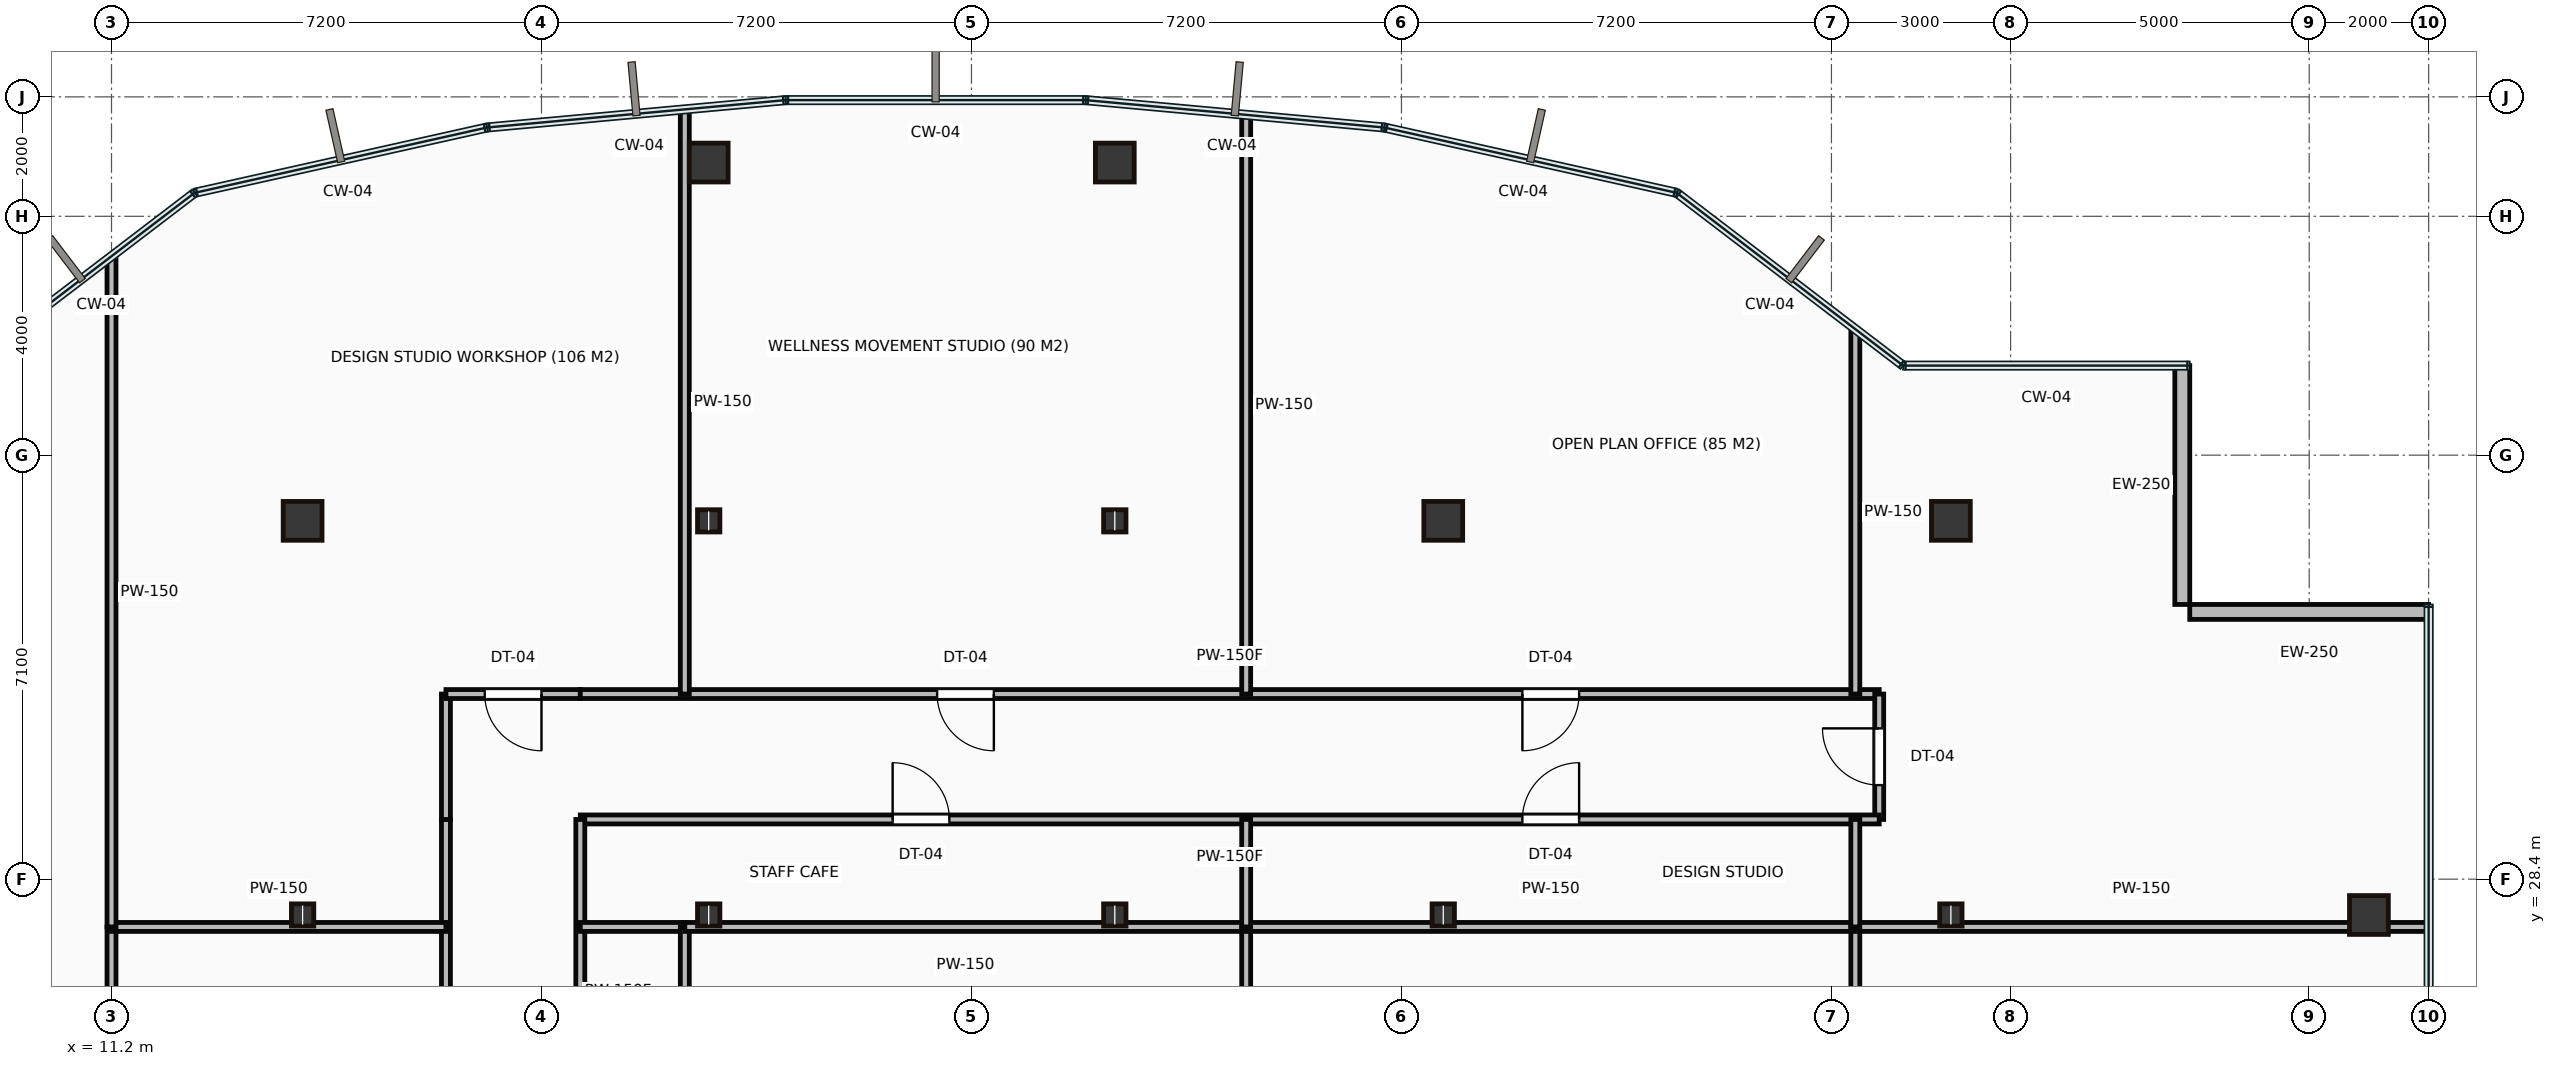
"""IFC4 building model, lengths in metres.
Left out: names, types, materials, properties, quantities, classifications, styles, units other than length and angle.
Written with IfcOpenShell. Run it as: python <this file> out.ifc"""

import sys

from ifc_helpers import new_model, si_unit, direction, frame, frame_2d, origin, origin_2d, place, context, subcontext, project, spatial, rectangle, hollow_rectangle, i_section, extrude, source, transform, mapped, element, fill, save


model = new_model("IFC4")
c1 = context("Model", 3, precision=1e-05, world=origin(), true_north=direction((0.0, 1.0)))
c2 = subcontext(c1, "Body", "Model", "MODEL_VIEW")
j1 = project(units=[si_unit("LENGTHUNIT", "METRE"), si_unit("PLANEANGLEUNIT", "RADIAN")], contexts=[c1])
p1 = place(None, origin())
s1 = spatial("IfcSite", under=j1, at=p1, CompositionType="ELEMENT")
p2 = place(p1, origin())
s2 = spatial("IfcBuilding", under=s1, at=p2, CompositionType="ELEMENT")
p3 = place(p2, frame((0.0, 0.0, 173.45)))
s3 = spatial("IfcBuildingStorey", under=s2, at=p3, CompositionType="ELEMENT", Elevation=173.45)
m1 = source(origin(), c2, "Body", "SweptSolid", [
    extrude(i_section(OverallWidth=0.374, OverallDepth=0.372, WebThickness=0.016, FlangeThickness=0.026, at=origin_2d()), origin(), (0.0, 0.0, 1.0), 3.65),
])
p4 = place(p3, frame((14.4, 27.8, 0.0), z_axis=(0.0, 0.0, 1.0), x_axis=(1.0, 0.0, 0.0)))
e1 = element("IfcColumn", 1, at=p4, inside=s3, PredefinedType="COLUMN", context=c2, shape_type="MappedRepresentation", body=[
    mapped(m1, transform((0.0, 0.0, 0.0))),
])
m2 = source(origin(), c2, "Body", "SweptSolid", [
    extrude(hollow_rectangle(XDim=0.65, YDim=0.65, WallThickness=0.032, at=origin_2d()), origin(), (0.0, 0.0, 1.0), 3.65),
])
p5 = place(p3, frame((14.4, 34.4, 0.0), z_axis=(0.0, 0.0, 1.0), x_axis=(1.0, 0.0, 0.0)))
e2 = element("IfcColumn", 2, at=p5, inside=s3, PredefinedType="COLUMN", context=c2, shape_type="MappedRepresentation", body=[
    mapped(m2, transform((0.0, 0.0, 0.0))),
])
for number, where, z_axis, x_axis in (
    (3, (21.2, 27.8, 0.0), (0.0, 0.0, 1.0), (1.0, 0.0, 0.0)),
    (4, (21.2, 34.4, 0.0), (0.0, 0.0, 1.0), (1.0, 0.0, 0.0)),
):
    element("IfcColumn", number, at=place(p3, frame(where, z_axis=z_axis, x_axis=x_axis)), inside=s3, PredefinedType="COLUMN", context=c2, shape_type="MappedRepresentation", body=[
        mapped(m1, transform((0.0, 0.0, 0.0))),
    ])
p6 = place(p3, frame((21.2, 40.4, 0.0), z_axis=(0.0, 0.0, 1.0), x_axis=(1.0, 0.0, 0.0)))
e5 = element("IfcColumn", 5, at=p6, inside=s3, PredefinedType="COLUMN", context=c2, shape_type="MappedRepresentation", body=[
    mapped(m2, transform((0.0, 0.0, 0.0))),
])
for number, where, z_axis, x_axis in (
    (6, (28.0, 27.8, 0.0), (0.0, 0.0, 1.0), (1.0, 0.0, 0.0)),
    (7, (28.0, 34.4, 0.0), (0.0, 0.0, 1.0), (1.0, 0.0, 0.0)),
):
    element("IfcColumn", number, at=place(p3, frame(where, z_axis=z_axis, x_axis=x_axis)), inside=s3, PredefinedType="COLUMN", context=c2, shape_type="MappedRepresentation", body=[
        mapped(m1, transform((0.0, 0.0, 0.0))),
    ])
p7 = place(p3, frame((28.0, 40.4, 0.0), z_axis=(0.0, 0.0, 1.0), x_axis=(1.0, 0.0, 0.0)))
e8 = element("IfcColumn", 8, at=p7, inside=s3, PredefinedType="COLUMN", context=c2, shape_type="MappedRepresentation", body=[
    mapped(m2, transform((0.0, 0.0, 0.0))),
])
p8 = place(p3, frame((33.5, 27.8, 0.0), z_axis=(0.0, 0.0, 1.0), x_axis=(1.0, 0.0, 0.0)))
e9 = element("IfcColumn", 9, at=p8, inside=s3, PredefinedType="COLUMN", context=c2, shape_type="MappedRepresentation", body=[
    mapped(m1, transform((0.0, 0.0, 0.0))),
])
p9 = place(p3, frame((33.5, 34.4, 0.0), z_axis=(0.0, 0.0, 1.0), x_axis=(1.0, 0.0, 0.0)))
e10 = element("IfcColumn", 10, at=p9, inside=s3, PredefinedType="COLUMN", context=c2, shape_type="MappedRepresentation", body=[
    mapped(m2, transform((0.0, 0.0, 0.0))),
])
p10 = place(p3, frame((42.0, 27.8, 0.0), z_axis=(0.0, 0.0, 1.0), x_axis=(1.0, 0.0, 0.0)))
e11 = element("IfcColumn", 11, at=p10, inside=s3, PredefinedType="COLUMN", context=c2, shape_type="MappedRepresentation", body=[
    mapped(m1, transform((0.0, 0.0, 0.0))),
])
for number, where, z_axis, x_axis in (
    (12, (42.0, 34.4, 0.0), (0.0, 0.0, 1.0), (1.0, 0.0, 0.0)),
    (13, (49.0, 27.8, 0.0), (0.0, 0.0, 1.0), (1.0, 0.0, 0.0)),
):
    element("IfcColumn", number, at=place(p3, frame(where, z_axis=z_axis, x_axis=x_axis)), inside=s3, PredefinedType="COLUMN", context=c2, shape_type="MappedRepresentation", body=[
        mapped(m2, transform((0.0, 0.0, 0.0))),
    ])
m3 = source(origin(), c2, "Body", "SweptSolid", [
    extrude(rectangle(XDim=4.0, YDim=0.25, at=frame_2d((2.0, 0.0))), origin(), (0.0, 0.0, 1.0), 3.4),
])
for number, where, z_axis, x_axis in (
    (14, (50.0, 32.875, 0.0), (0.0, 0.0, 1.0), (-1.0, 0.0, 0.0)),
    (15, (45.875, 33.0, 0.0), (0.0, 0.0, 1.0), (0.0, 1.0, 0.0)),
):
    element("IfcWall", number, at=place(p3, frame(where, z_axis=z_axis, x_axis=x_axis)), inside=s3, PredefinedType="STANDARD", context=c2, shape_type="MappedRepresentation", body=[
        mapped(m3, transform((0.0, 0.0, 0.0))),
    ])
m4 = source(origin(), c2, "Body", "SweptSolid", [
    extrude(rectangle(XDim=13.1, YDim=0.15, at=frame_2d((6.55, 0.0))), origin(), (0.0, 0.0, 1.0), 3.4),
])
p11 = place(p3, frame((16.8, 16.3, 0.0), z_axis=(0.0, 0.0, 1.0), x_axis=(0.0, 1.0, 0.0)))
e16 = element("IfcWall", 16, at=p11, inside=s3, PredefinedType="PARTITIONING", context=c2, shape_type="MappedRepresentation", body=[
    mapped(m4, transform((0.0, 0.0, 0.0))),
])
p12 = place(p11, frame((5.305, 0.0, 0.0)))
e17 = element("IfcOpeningElement", 17, at=p12, cuts=e16, PredefinedType="OPENING", context=c2, shape_type="SweptSolid", body=[
    extrude(rectangle(XDim=0.95, YDim=2.15, at=frame_2d((0.475, 1.075))), frame((0.0, 0.085, 0.0), z_axis=(0.0, -1.0, 0.0), x_axis=(1.0, 0.0, 0.0)), (0.0, 0.0, 1.0), 0.17),
])
m5 = source(origin(), c2, "Body", "SweptSolid", [
    extrude(rectangle(XDim=2.1, YDim=0.15, at=frame_2d((1.05, 0.0))), origin(), (0.0, 0.0, 1.0), 3.4),
])
p13 = place(p3, frame((16.8, 29.4, 0.0), z_axis=(0.0, 0.0, 1.0), x_axis=(0.0, 1.0, 0.0)))
e18 = element("IfcWall", 18, at=p13, inside=s3, PredefinedType="PARTITIONING", context=c2, shape_type="MappedRepresentation", body=[
    mapped(m5, transform((0.0, 0.0, 0.0))),
])
m6 = source(origin(), c2, "Body", "SweptSolid", [
    extrude(rectangle(XDim=2.25, YDim=0.15, at=frame_2d((1.125, 0.0))), origin(), (0.0, 0.0, 1.0), 3.4),
])
p14 = place(p3, frame((16.8, 31.5, 0.0), z_axis=(0.0, 0.0, 1.0), x_axis=(1.0, 0.0, 0.0)))
e19 = element("IfcWall", 19, at=p14, inside=s3, PredefinedType="PARTITIONING", context=c2, shape_type="MappedRepresentation", body=[
    mapped(m6, transform((0.0, 0.0, 0.0))),
])
p15 = place(p14, frame((0.65, 0.0, 0.0)))
e20 = element("IfcOpeningElement", 20, at=p15, cuts=e19, PredefinedType="OPENING", context=c2, shape_type="SweptSolid", body=[
    extrude(rectangle(XDim=0.95, YDim=2.15, at=frame_2d((0.475, 1.075))), frame((0.0, 0.085, 0.0), z_axis=(0.0, -1.0, 0.0), x_axis=(1.0, 0.0, 0.0)), (0.0, 0.0, 1.0), 0.17),
])
m7 = source(origin(), c2, "Body", "SweptSolid", [
    extrude(rectangle(XDim=21.75, YDim=0.15, at=frame_2d((10.875, 0.0))), origin(), (0.0, 0.0, 1.0), 3.4),
])
p16 = place(p3, frame((19.05, 31.5, 0.0), z_axis=(0.0, 0.0, 1.0), x_axis=(1.0, 0.0, 0.0)))
e21 = element("IfcWall", 21, at=p16, inside=s3, PredefinedType="PARTITIONING", context=c2, shape_type="MappedRepresentation", body=[
    mapped(m7, transform((0.0, 0.0, 0.0))),
])
p17 = place(p16, frame((5.975, 0.0, 0.0)))
e22 = element("IfcOpeningElement", 22, at=p17, cuts=e21, PredefinedType="OPENING", context=c2, shape_type="SweptSolid", body=[
    extrude(rectangle(XDim=0.95, YDim=2.15, at=frame_2d((0.475, 1.075))), frame((0.0, 0.085, 0.0), z_axis=(0.0, -1.0, 0.0), x_axis=(1.0, 0.0, 0.0)), (0.0, 0.0, 1.0), 0.17),
])
p18 = place(p16, frame((15.775, 0.0, 0.0)))
e23 = element("IfcOpeningElement", 23, at=p18, cuts=e21, PredefinedType="OPENING", context=c2, shape_type="SweptSolid", body=[
    extrude(rectangle(XDim=0.95, YDim=2.15, at=frame_2d((0.475, 1.075))), frame((0.0, 0.085, 0.0), z_axis=(0.0, -1.0, 0.0), x_axis=(1.0, 0.0, 0.0)), (0.0, 0.0, 1.0), 0.17),
])
p19 = place(p3, frame((40.8, 31.5, 0.0), z_axis=(0.0, 0.0, 1.0), x_axis=(0.0, -1.0, 0.0)))
e24 = element("IfcWall", 24, at=p19, inside=s3, PredefinedType="PARTITIONING", context=c2, shape_type="MappedRepresentation", body=[
    mapped(m5, transform((0.0, 0.0, 0.0))),
])
p20 = place(p19, frame((0.575, 0.0, 0.0)))
e25 = element("IfcOpeningElement", 25, at=p20, cuts=e24, PredefinedType="OPENING", context=c2, shape_type="SweptSolid", body=[
    extrude(rectangle(XDim=0.95, YDim=2.15, at=frame_2d((0.475, 1.075))), frame((0.0, 0.085, 0.0), z_axis=(0.0, -1.0, 0.0), x_axis=(1.0, 0.0, 0.0)), (0.0, 0.0, 1.0), 0.17),
])
p21 = place(p3, frame((40.8, 29.4, 0.0), z_axis=(0.0, 0.0, 1.0), x_axis=(-1.0, 0.0, 0.0)))
e26 = element("IfcWall", 26, at=p21, inside=s3, PredefinedType="PARTITIONING", context=c2, shape_type="MappedRepresentation", body=[
    mapped(m7, transform((0.0, 0.0, 0.0))),
])
p22 = place(p21, frame((15.57, 0.0, 0.0)))
e27 = element("IfcOpeningElement", 27, at=p22, cuts=e26, PredefinedType="OPENING", context=c2, shape_type="SweptSolid", body=[
    extrude(rectangle(XDim=0.95, YDim=2.15, at=frame_2d((0.475, 1.075))), frame((0.0, 0.085, 0.0), z_axis=(0.0, -1.0, 0.0), x_axis=(1.0, 0.0, 0.0)), (0.0, 0.0, 1.0), 0.17),
])
p23 = place(p21, frame((5.025, 0.0, 0.0)))
e28 = element("IfcOpeningElement", 28, at=p23, cuts=e26, PredefinedType="OPENING", context=c2, shape_type="SweptSolid", body=[
    extrude(rectangle(XDim=0.95, YDim=2.15, at=frame_2d((0.475, 1.075))), frame((0.0, 0.085, 0.0), z_axis=(0.0, -1.0, 0.0), x_axis=(1.0, 0.0, 0.0)), (0.0, 0.0, 1.0), 0.17),
])
p24 = place(p3, frame((19.05, 29.4, 0.0), z_axis=(0.0, 0.0, 1.0), x_axis=(0.0, -1.0, 0.0)))
e29 = element("IfcWall", 29, at=p24, inside=s3, PredefinedType="PARTITIONING", context=c2, shape_type="MappedRepresentation", body=[
    mapped(m4, transform((0.0, 0.0, 0.0))),
])
p25 = place(p24, frame((6.845, 0.0, 0.0)))
e30 = element("IfcOpeningElement", 30, at=p25, cuts=e29, PredefinedType="OPENING", context=c2, shape_type="SweptSolid", body=[
    extrude(rectangle(XDim=0.95, YDim=2.15, at=frame_2d((0.475, 1.075))), frame((0.0, 0.085, 0.0), z_axis=(0.0, -1.0, 0.0), x_axis=(1.0, 0.0, 0.0)), (0.0, 0.0, 1.0), 0.17),
])
m8 = source(origin(), c2, "Body", "SweptSolid", [
    extrude(rectangle(XDim=11.3, YDim=0.15, at=frame_2d((5.65, 0.0))), origin(), (0.0, 0.0, 1.0), 3.4),
])
p26 = place(p3, frame((11.2, 27.6, 0.0), z_axis=(0.0, 0.0, 1.0), x_axis=(0.0, -1.0, 0.0)))
e31 = element("IfcWall", 31, at=p26, inside=s3, PredefinedType="PARTITIONING", context=c2, shape_type="MappedRepresentation", body=[
    mapped(m8, transform((0.0, 0.0, 0.0))),
])
m9 = source(origin(), c2, "Body", "SweptSolid", [
    extrude(rectangle(XDim=5.6, YDim=0.15, at=frame_2d((2.8, 0.0))), origin(), (0.0, 0.0, 1.0), 3.4),
])
p27 = place(p3, frame((11.2, 27.6, 0.0), z_axis=(0.0, 0.0, 1.0), x_axis=(1.0, 0.0, 0.0)))
e32 = element("IfcWall", 32, at=p27, inside=s3, PredefinedType="PARTITIONING", context=c2, shape_type="MappedRepresentation", body=[
    mapped(m9, transform((0.0, 0.0, 0.0))),
])
m10 = source(origin(), c2, "Body", "SweptSolid", [
    extrude(rectangle(XDim=11.206, YDim=0.15, at=frame_2d((5.603, 0.0))), origin(), (0.0, 0.0, 1.0), 3.4),
])
p28 = place(p3, frame((11.2, 38.806, 0.0), z_axis=(0.0, 0.0, 1.0), x_axis=(0.0, -1.0, 0.0)))
e33 = element("IfcWall", 33, at=p28, inside=s3, PredefinedType="PARTITIONING", context=c2, shape_type="MappedRepresentation", body=[
    mapped(m10, transform((0.0, 0.0, 0.0))),
])
m11 = source(origin(), c2, "Body", "SweptSolid", [
    extrude(rectangle(XDim=1.75, YDim=0.15, at=frame_2d((0.875, 0.0))), origin(), (0.0, 0.0, 1.0), 3.4),
])
p29 = place(p3, frame((19.05, 27.6, 0.0), z_axis=(0.0, 0.0, 1.0), x_axis=(1.0, 0.0, 0.0)))
e34 = element("IfcWall", 34, at=p29, inside=s3, PredefinedType="PARTITIONING", context=c2, shape_type="MappedRepresentation", body=[
    mapped(m11, transform((0.0, 0.0, 0.0))),
])
p30 = place(p3, frame((20.8, 27.6, 0.0), z_axis=(0.0, 0.0, 1.0), x_axis=(0.0, -1.0, 0.0)))
e35 = element("IfcWall", 35, at=p30, inside=s3, PredefinedType="PARTITIONING", context=c2, shape_type="MappedRepresentation", body=[
    mapped(m8, transform((0.0, 0.0, 0.0))),
])
m12 = source(origin(), c2, "Body", "SweptSolid", [
    extrude(rectangle(XDim=9.4, YDim=0.15, at=frame_2d((4.7, 0.0))), origin(), (0.0, 0.0, 1.0), 3.4),
])
p31 = place(p3, frame((30.2, 27.6, 0.0), z_axis=(0.0, 0.0, 1.0), x_axis=(-1.0, 0.0, 0.0)))
e36 = element("IfcWall", 36, at=p31, inside=s3, PredefinedType="PARTITIONING", context=c2, shape_type="MappedRepresentation", body=[
    mapped(m12, transform((0.0, 0.0, 0.0))),
])
m13 = source(origin(), c2, "Body", "SweptSolid", [
    extrude(rectangle(XDim=9.771, YDim=0.15, at=frame_2d((4.885, 0.0))), origin(), (0.0, 0.0, 1.0), 3.4),
])
p32 = place(p3, frame((20.8, 41.271, 0.0), z_axis=(0.0, 0.0, 1.0), x_axis=(0.0, -1.0, 0.0)))
e37 = element("IfcWall", 37, at=p32, inside=s3, PredefinedType="PARTITIONING", context=c2, shape_type="MappedRepresentation", body=[
    mapped(m13, transform((0.0, 0.0, 0.0))),
])
p33 = place(p3, frame((30.2, 27.6, 0.0), z_axis=(0.0, 0.0, 1.0), x_axis=(0.0, -1.0, 0.0)))
e38 = element("IfcWall", 38, at=p33, inside=s3, PredefinedType="PARTITIONING", context=c2, shape_type="MappedRepresentation", body=[
    mapped(m8, transform((0.0, 0.0, 0.0))),
])
m14 = source(origin(), c2, "Body", "SweptSolid", [
    extrude(rectangle(XDim=10.2, YDim=0.15, at=frame_2d((5.1, 0.0))), origin(), (0.0, 0.0, 1.0), 3.4),
])
p34 = place(p3, frame((30.2, 27.6, 0.0), z_axis=(0.0, 0.0, 1.0), x_axis=(1.0, 0.0, 0.0)))
e39 = element("IfcWall", 39, at=p34, inside=s3, PredefinedType="PARTITIONING", context=c2, shape_type="MappedRepresentation", body=[
    mapped(m14, transform((0.0, 0.0, 0.0))),
])
m15 = source(origin(), c2, "Body", "SweptSolid", [
    extrude(rectangle(XDim=1.8, YDim=0.15, at=frame_2d((0.9, 0.0))), origin(), (0.0, 0.0, 1.0), 3.4),
])
p35 = place(p3, frame((30.2, 29.4, 0.0), z_axis=(0.0, 0.0, 1.0), x_axis=(0.0, -1.0, 0.0)))
e40 = element("IfcWall", 40, at=p35, inside=s3, PredefinedType="PARTITIONING", context=c2, shape_type="MappedRepresentation", body=[
    mapped(m15, transform((0.0, 0.0, 0.0))),
])
m16 = source(origin(), c2, "Body", "SweptSolid", [
    extrude(rectangle(XDim=9.679, YDim=0.15, at=frame_2d((4.839, 0.0))), origin(), (0.0, 0.0, 1.0), 3.4),
])
p36 = place(p3, frame((30.2, 41.179, 0.0), z_axis=(0.0, 0.0, 1.0), x_axis=(0.0, -1.0, 0.0)))
e41 = element("IfcWall", 41, at=p36, inside=s3, PredefinedType="PARTITIONING", context=c2, shape_type="MappedRepresentation", body=[
    mapped(m16, transform((0.0, 0.0, 0.0))),
])
p37 = place(p3, frame((40.4, 27.6, 0.0), z_axis=(0.0, 0.0, 1.0), x_axis=(0.0, -1.0, 0.0)))
e42 = element("IfcWall", 42, at=p37, inside=s3, PredefinedType="PARTITIONING", context=c2, shape_type="MappedRepresentation", body=[
    mapped(m8, transform((0.0, 0.0, 0.0))),
])
m17 = source(origin(), c2, "Body", "SweptSolid", [
    extrude(rectangle(XDim=9.58, YDim=0.15, at=frame_2d((4.79, 0.0))), origin(), (0.0, 0.0, 1.0), 3.4),
])
p38 = place(p3, frame((40.4, 27.6, 0.0), z_axis=(0.0, 0.0, 1.0), x_axis=(1.0, 0.0, 0.0)))
e43 = element("IfcWall", 43, at=p38, inside=s3, PredefinedType="PARTITIONING", context=c2, shape_type="MappedRepresentation", body=[
    mapped(m17, transform((0.0, 0.0, 0.0))),
])
p39 = place(p3, frame((40.4, 29.4, 0.0), z_axis=(0.0, 0.0, 1.0), x_axis=(0.0, -1.0, 0.0)))
e44 = element("IfcWall", 44, at=p39, inside=s3, PredefinedType="PARTITIONING", context=c2, shape_type="MappedRepresentation", body=[
    mapped(m15, transform((0.0, 0.0, 0.0))),
])
m18 = source(origin(), c2, "Body", "SweptSolid", [
    extrude(rectangle(XDim=6.085, YDim=0.15, at=frame_2d((3.043, 0.0))), origin(), (0.0, 0.0, 1.0), 3.4),
])
p40 = place(p3, frame((40.4, 37.585, 0.0), z_axis=(0.0, 0.0, 1.0), x_axis=(0.0, -1.0, 0.0)))
e45 = element("IfcWall", 45, at=p40, inside=s3, PredefinedType="PARTITIONING", context=c2, shape_type="MappedRepresentation", body=[
    mapped(m18, transform((0.0, 0.0, 0.0))),
])
m19 = source(origin(), c2, "Body", "SweptSolid", [
    extrude(rectangle(XDim=0.95, YDim=2.15, at=frame_2d((0.475, 1.075))), frame((0.0, 0.025, 0.0), z_axis=(0.0, -1.0, 0.0), x_axis=(1.0, 0.0, 0.0)), (0.0, 0.0, 1.0), 0.05),
])
p41 = place(p15, origin())
e46 = element("IfcDoor", 46, at=p41, inside=s3, OperationType="SINGLE_SWING_RIGHT", PredefinedType="DOOR", context=c2, shape_type="MappedRepresentation", body=[
    mapped(m19, transform((0.0, 0.0, 0.0))),
])
fill(e20, e46)
p42 = place(p22, origin())
e47 = element("IfcDoor", 47, at=p42, inside=s3, OperationType="SINGLE_SWING_RIGHT", PredefinedType="DOOR", context=c2, shape_type="MappedRepresentation", body=[
    mapped(m19, transform((0.0, 0.0, 0.0))),
])
fill(e27, e47)
p43 = place(p17, origin())
e48 = element("IfcDoor", 48, at=p43, inside=s3, OperationType="SINGLE_SWING_RIGHT", PredefinedType="DOOR", context=c2, shape_type="MappedRepresentation", body=[
    mapped(m19, transform((0.0, 0.0, 0.0))),
])
fill(e22, e48)
p44 = place(p18, origin())
e49 = element("IfcDoor", 49, at=p44, inside=s3, OperationType="SINGLE_SWING_LEFT", PredefinedType="DOOR", context=c2, shape_type="MappedRepresentation", body=[
    mapped(m19, transform((0.0, 0.0, 0.0))),
])
fill(e23, e49)
p45 = place(p23, origin())
e50 = element("IfcDoor", 50, at=p45, inside=s3, OperationType="SINGLE_SWING_LEFT", PredefinedType="DOOR", context=c2, shape_type="MappedRepresentation", body=[
    mapped(m19, transform((0.0, 0.0, 0.0))),
])
fill(e28, e50)
p46 = place(p20, origin())
e51 = element("IfcDoor", 51, at=p46, inside=s3, OperationType="SINGLE_SWING_LEFT", PredefinedType="DOOR", context=c2, shape_type="MappedRepresentation", body=[
    mapped(m19, transform((0.0, 0.0, 0.0))),
])
fill(e25, e51)
save(model, sys.argv[1])
